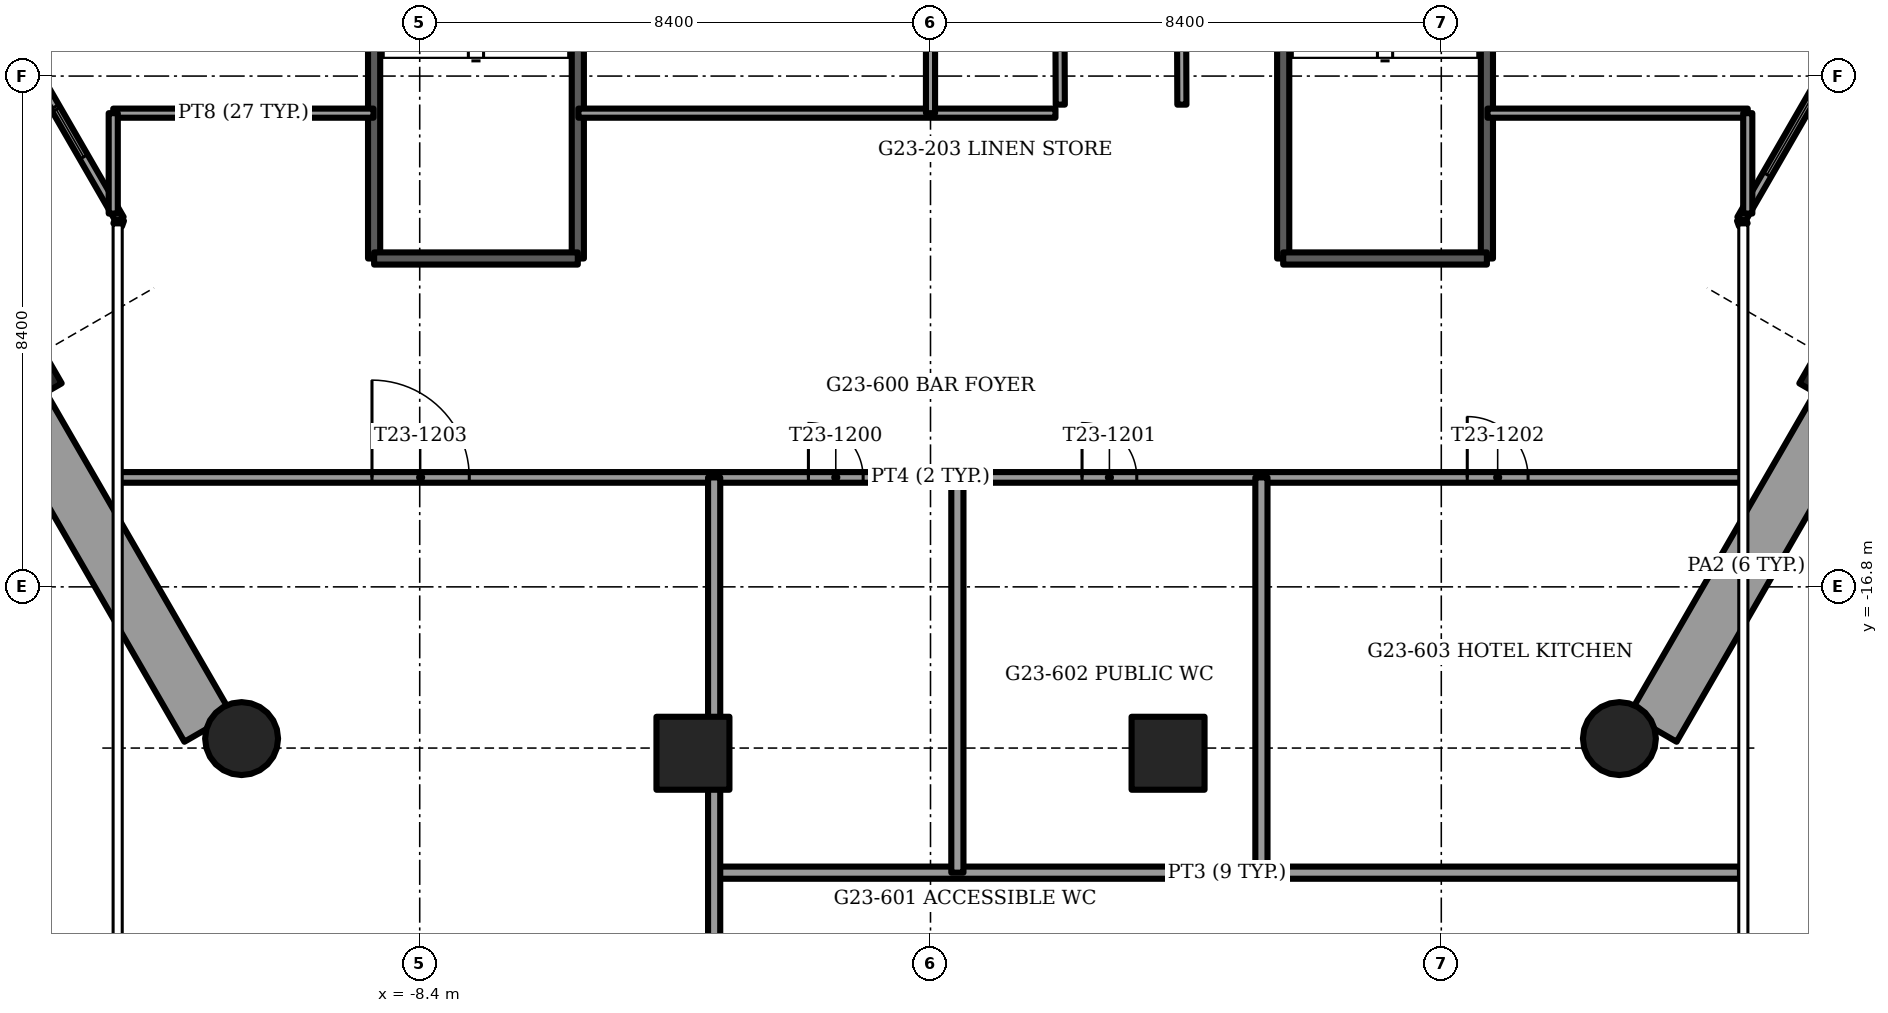
"""IFC4 building model, lengths in metres.
Left out: names, types, materials, properties, quantities, classifications, styles, units other than length and angle.
Written with IfcOpenShell. Run it as: python <this file> out.ifc"""

import sys

from ifc_helpers import new_model, si_unit, direction, frame, frame_2d, origin, origin_2d, place, context, subcontext, project, spatial, rectangle, circle, extrude, element, fill, save


model = new_model("IFC4")
c1 = context("Model", 3, precision=1e-05, world=origin(), true_north=direction((0.0, 1.0)))
c2 = subcontext(c1, "Body", "Model", "MODEL_VIEW")
j1 = project(units=[si_unit("LENGTHUNIT", "METRE"), si_unit("PLANEANGLEUNIT", "RADIAN")], contexts=[c1])
p1 = place(None, origin())
s1 = spatial("IfcSite", under=j1, at=p1, CompositionType="ELEMENT")
p2 = place(p1, origin())
s2 = spatial("IfcBuilding", under=s1, at=p2, CompositionType="ELEMENT")
p3 = place(p2, frame((0.0, 0.0, 93.0)))
s3 = spatial("IfcBuildingStorey", under=s2, at=p3, CompositionType="ELEMENT", Elevation=93.0)
for number, where, z_axis, x_axis in (
    (1, (-11.329, -19.295, -1.2), (0.0, 0.0, 1.0), (1.0, 0.0, 0.0)),
    (2, (11.329, -19.295, -1.2), (0.0, 0.0, 1.0), (1.0, 0.0, 0.0)),
):
    element("IfcColumn", number, at=place(p3, frame(where, z_axis=z_axis, x_axis=x_axis)), inside=s3, PredefinedType="COLUMN", context=c2, shape_type="SweptSolid", body=[
        extrude(circle(Radius=0.6, at=origin_2d()), origin(), (0.0, 0.0, 1.0), 3.75),
    ])
for number, where, z_axis, x_axis in (
    (3, (-15.107, -13.233, -1.2), (0.0, 0.0, 1.0), (-0.5, 0.866, 0.0)),
    (4, (-3.907, -19.536, -1.2), (0.0, 0.0, 1.0), (-1.0, 0.0, 0.0)),
    (5, (3.907, -19.536, -1.2), (0.0, 0.0, 1.0), (-1.0, 0.0, 0.0)),
    (6, (15.107, -13.233, -1.2), (0.0, 0.0, 1.0), (-0.5, -0.866, 0.0)),
):
    element("IfcColumn", number, at=place(p3, frame(where, z_axis=z_axis, x_axis=x_axis)), inside=s3, PredefinedType="COLUMN", context=c2, shape_type="SweptSolid", body=[
        extrude(rectangle(XDim=1.2, YDim=1.2, at=origin_2d()), origin(), (0.0, 0.0, 1.0), 3.75),
    ])
for number, where, z_axis, x_axis in (
    (7, (-14.952, -13.802, 0.0), (0.0, 0.0, 1.0), (0.5, -0.866, 0.0)),
    (8, (11.88, -19.123, 0.0), (0.0, 0.0, 1.0), (0.5, 0.866, 0.0)),
):
    element("IfcWall", number, at=place(p3, frame(where, z_axis=z_axis, x_axis=x_axis)), inside=s3, PredefinedType="PARAPET", context=c2, shape_type="SweptSolid", body=[
        extrude(rectangle(XDim=6.144, YDim=0.9, at=frame_2d((3.072, 0.0))), origin(), (0.0, 0.0, 1.0), 1.1),
    ])
p4 = place(p3, frame((-19.141, -0.696, 0.0), z_axis=(0.0, 0.0, 1.0), x_axis=(0.500002662854, -0.86602386638, 0.0)))
e9 = element("IfcWall", 9, at=p4, inside=s3, PredefinedType="SOLIDWALL", context=c2, shape_type="SweptSolid", body=[
    extrude(rectangle(XDim=11.615, YDim=0.15, at=frame_2d((5.807, 0.0))), origin(), (0.0, 0.0, 1.0), 3.45),
])
p5 = place(p4, frame((3.792, 0.0, 0.15)))
e10 = element("IfcOpeningElement", 10, at=p5, cuts=e9, PredefinedType="OPENING", context=c2, shape_type="SweptSolid", body=[
    extrude(rectangle(XDim=1.7, YDim=2.2, at=frame_2d((0.85, 1.1))), frame((0.0, 0.075, 0.0), z_axis=(0.0, -1.0, 0.0), x_axis=(1.0, 0.0, 0.0)), (0.0, 0.0, 1.0), 0.15),
])
p6 = place(p4, frame((9.531, 0.0, 0.15)))
e11 = element("IfcOpeningElement", 11, at=p6, cuts=e9, PredefinedType="OPENING", context=c2, shape_type="SweptSolid", body=[
    extrude(rectangle(XDim=0.9, YDim=2.2, at=frame_2d((0.45, 1.1))), frame((0.0, 0.075, 0.0), z_axis=(0.0, -1.0, 0.0), x_axis=(1.0, 0.0, 0.0)), (0.0, 0.0, 1.0), 0.15),
])
p7 = place(p4, frame((7.98, 0.0, 0.0)))
e12 = element("IfcOpeningElement", 12, at=p7, cuts=e9, PredefinedType="OPENING", context=c2, shape_type="SweptSolid", body=[
    extrude(rectangle(XDim=1.5, YDim=2.4, at=frame_2d((0.75, 1.2))), frame((0.0, 0.075, 0.0), z_axis=(0.0, -1.0, 0.0), x_axis=(1.0, 0.0, 0.0)), (0.0, 0.0, 1.0), 0.15),
])
p8 = place(p3, frame((13.334, -10.755, 0.0), z_axis=(0.0, 0.0, 1.0), x_axis=(0.500002662854, 0.86602386638, 0.0)))
e13 = element("IfcWall", 13, at=p8, inside=s3, PredefinedType="SOLIDWALL", context=c2, shape_type="SweptSolid", body=[
    extrude(rectangle(XDim=11.615, YDim=0.15, at=frame_2d((5.807, 0.0))), origin(), (0.0, 0.0, 1.0), 3.45),
])
p9 = place(p8, frame((0.847, 0.0, 0.15)))
e14 = element("IfcOpeningElement", 14, at=p9, cuts=e13, PredefinedType="OPENING", context=c2, shape_type="SweptSolid", body=[
    extrude(rectangle(XDim=1.7, YDim=2.2, at=frame_2d((0.85, 1.1))), frame((0.0, 0.075, 0.0), z_axis=(0.0, -1.0, 0.0), x_axis=(1.0, 0.0, 0.0)), (0.0, 0.0, 1.0), 0.15),
])
p10 = place(p8, frame((6.322, 0.0, 0.15)))
e15 = element("IfcOpeningElement", 15, at=p10, cuts=e13, PredefinedType="OPENING", context=c2, shape_type="SweptSolid", body=[
    extrude(rectangle(XDim=1.5, YDim=2.2, at=frame_2d((0.75, 1.1))), frame((0.0, 0.075, 0.0), z_axis=(0.0, -1.0, 0.0), x_axis=(1.0, 0.0, 0.0)), (0.0, 0.0, 1.0), 0.15),
])
for number, where, z_axis, x_axis in (
    (16, (-13.334, -10.755, 0.0), (0.0, 0.0, 1.0), (-0.338, -0.941, 0.0)),
    (17, (13.334, -10.755, 0.0), (0.0, 0.0, 1.0), (0.338, -0.941, 0.0)),
):
    element("IfcWall", number, at=place(p3, frame(where, z_axis=z_axis, x_axis=x_axis)), inside=s3, PredefinedType="SOLIDWALL", context=c2, shape_type="SweptSolid", body=[
        extrude(rectangle(XDim=0.098, YDim=0.15, at=frame_2d((0.049, 0.0))), origin(), (0.0, 0.0, 1.0), 3.45),
    ])
for number, where, z_axis, x_axis in (
    (18, (5.8, -3.7, -0.3), (0.0, 0.0, 1.0), (0.0, -1.0, 0.0)),
    (19, (9.15, -3.7, -0.3), (0.0, 0.0, 1.0), (0.0, -1.0, 0.0)),
):
    element("IfcWall", number, at=place(p3, frame(where, z_axis=z_axis, x_axis=x_axis)), inside=s3, PredefinedType="SOLIDWALL", context=c2, shape_type="SweptSolid", body=[
        extrude(rectangle(XDim=7.7, YDim=0.2, at=frame_2d((3.85, 0.0))), origin(), (0.0, 0.0, 1.0), 3.75),
    ])
p11 = place(p3, frame((5.8, -11.4, -0.3), z_axis=(0.0, 0.0, 1.0), x_axis=(1.0, 0.0, 0.0)))
e20 = element("IfcWall", 20, at=p11, inside=s3, PredefinedType="SOLIDWALL", context=c2, shape_type="SweptSolid", body=[
    extrude(rectangle(XDim=3.35, YDim=0.2, at=frame_2d((1.675, 0.0))), origin(), (0.0, 0.0, 1.0), 3.75),
])
for number, where, z_axis, x_axis in (
    (21, (-9.15, -3.7, -0.3), (0.0, 0.0, 1.0), (0.0, -1.0, 0.0)),
    (22, (-5.8, -3.7, -0.3), (0.0, 0.0, 1.0), (0.0, -1.0, 0.0)),
):
    element("IfcWall", number, at=place(p3, frame(where, z_axis=z_axis, x_axis=x_axis)), inside=s3, PredefinedType="SOLIDWALL", context=c2, shape_type="SweptSolid", body=[
        extrude(rectangle(XDim=7.7, YDim=0.2, at=frame_2d((3.85, 0.0))), origin(), (0.0, 0.0, 1.0), 3.75),
    ])
p12 = place(p3, frame((-9.15, -11.4, -0.3), z_axis=(0.0, 0.0, 1.0), x_axis=(1.0, 0.0, 0.0)))
e23 = element("IfcWall", 23, at=p12, inside=s3, PredefinedType="SOLIDWALL", context=c2, shape_type="SweptSolid", body=[
    extrude(rectangle(XDim=3.35, YDim=0.2, at=frame_2d((1.675, 0.0))), origin(), (0.0, 0.0, 1.0), 3.75),
])
p13 = place(p3, frame((-13.44, -9.01, 0.0), z_axis=(0.0, 0.0, 1.0), x_axis=(1.0, 0.0, 0.0)))
e24 = element("IfcWall", 24, at=p13, inside=s3, PredefinedType="PARTITIONING", context=c2, shape_type="SweptSolid", body=[
    extrude(rectangle(XDim=4.28, YDim=0.15, at=frame_2d((2.14, 0.0))), origin(), (0.0, 0.0, 1.0), 3.45),
])
p14 = place(p3, frame((-5.79, -9.01, 0.0), z_axis=(0.0, 0.0, 1.0), x_axis=(1.0, 0.0, 0.0)))
e25 = element("IfcWall", 25, at=p14, inside=s3, PredefinedType="PARTITIONING", context=c2, shape_type="SweptSolid", body=[
    extrude(rectangle(XDim=7.845, YDim=0.15, at=frame_2d((3.922, 0.0))), origin(), (0.0, 0.0, 1.0), 3.45),
])
p15 = place(p3, frame((9.16, -9.01, 0.0), z_axis=(0.0, 0.0, 1.0), x_axis=(1.0, 0.0, 0.0)))
e26 = element("IfcWall", 26, at=p15, inside=s3, PredefinedType="PARTITIONING", context=c2, shape_type="SweptSolid", body=[
    extrude(rectangle(XDim=4.28, YDim=0.15, at=frame_2d((2.14, 0.0))), origin(), (0.0, 0.0, 1.0), 3.45),
])
p16 = place(p3, frame((13.44, -10.661, 0.0), z_axis=(0.0, 0.0, 1.0), x_axis=(0.0, 1.0, 0.0)))
e27 = element("IfcWall", 27, at=p16, inside=s3, PredefinedType="PARTITIONING", context=c2, shape_type="SweptSolid", body=[
    extrude(rectangle(XDim=1.651, YDim=0.15, at=frame_2d((0.825, 0.0))), origin(), (0.0, 0.0, 1.0), 3.45),
])
p17 = place(p3, frame((0.0, -9.01, 0.0), z_axis=(0.0, 0.0, 1.0), x_axis=(0.0, 1.0, 0.0)))
e28 = element("IfcWall", 28, at=p17, inside=s3, PredefinedType="PARTITIONING", context=c2, shape_type="SweptSolid", body=[
    extrude(rectangle(XDim=5.31, YDim=0.15, at=frame_2d((2.655, 0.0))), origin(), (0.0, 0.0, 1.0), 3.45),
])
p18 = place(p3, frame((-13.44, -10.661, 0.0), z_axis=(0.0, 0.0, 1.0), x_axis=(0.0, 1.0, 0.0)))
e29 = element("IfcWall", 29, at=p18, inside=s3, PredefinedType="PARTITIONING", context=c2, shape_type="SweptSolid", body=[
    extrude(rectangle(XDim=1.651, YDim=0.15, at=frame_2d((0.825, 0.0))), origin(), (0.0, 0.0, 1.0), 3.45),
])
p19 = place(p3, frame((4.134, -8.87, 0.0), z_axis=(0.0, 0.0, 1.0), x_axis=(-0.003683216269, 0.999993216936, 0.0)))
e30 = element("IfcWall", 30, at=p19, inside=s3, PredefinedType="PARTITIONING", context=c2, shape_type="SweptSolid", body=[
    extrude(rectangle(XDim=5.17, YDim=0.15, at=frame_2d((2.585, 0.0))), origin(), (0.0, 0.0, 1.0), 3.45),
])
p20 = place(p3, frame((2.134, -8.87, 0.0), z_axis=(0.0, 0.0, 1.0), x_axis=(-0.003686872276, 0.999993203463, 0.0)))
e31 = element("IfcWall", 31, at=p20, inside=s3, PredefinedType="PARTITIONING", context=c2, shape_type="SweptSolid", body=[
    extrude(rectangle(XDim=5.165, YDim=0.15, at=frame_2d((2.583, 0.0))), origin(), (0.0, 0.0, 1.0), 3.45),
])
p21 = place(p3, frame((-13.348, -15.0, 0.0), z_axis=(0.0, 0.0, 1.0), x_axis=(1.0, 0.0, 0.0)))
e32 = element("IfcWall", 32, at=p21, inside=s3, PredefinedType="PARTITIONING", context=c2, shape_type="SweptSolid", body=[
    extrude(rectangle(XDim=26.696, YDim=0.175, at=frame_2d((13.348, 0.0))), origin(), (0.0, 0.0, 1.0), 3.45),
])
p22 = place(p21, frame((11.34, 0.0, 0.0)))
e33 = element("IfcOpeningElement", 33, at=p22, cuts=e32, PredefinedType="OPENING", context=c2, shape_type="SweptSolid", body=[
    extrude(rectangle(XDim=0.9, YDim=2.1, at=frame_2d((0.45, 1.05))), frame((0.0, 0.087, 0.0), z_axis=(0.0, -1.0, 0.0), x_axis=(1.0, 0.0, 0.0)), (0.0, 0.0, 1.0), 0.175),
])
p23 = place(p21, frame((15.84, 0.0, 0.0)))
e34 = element("IfcOpeningElement", 34, at=p23, cuts=e32, PredefinedType="OPENING", context=c2, shape_type="SweptSolid", body=[
    extrude(rectangle(XDim=0.9, YDim=2.1, at=frame_2d((0.45, 1.05))), frame((0.0, 0.087, 0.0), z_axis=(0.0, -1.0, 0.0), x_axis=(1.0, 0.0, 0.0)), (0.0, 0.0, 1.0), 0.175),
])
p24 = place(p21, frame((22.175, 0.0, 0.0)))
e35 = element("IfcOpeningElement", 35, at=p24, cuts=e32, PredefinedType="OPENING", context=c2, shape_type="SweptSolid", body=[
    extrude(rectangle(XDim=1.0, YDim=2.1, at=frame_2d((0.5, 1.05))), frame((0.0, 0.087, 0.0), z_axis=(0.0, -1.0, 0.0), x_axis=(1.0, 0.0, 0.0)), (0.0, 0.0, 1.0), 0.175),
])
p25 = place(p21, frame((4.163, 0.0, 0.0)))
e36 = element("IfcOpeningElement", 36, at=p25, cuts=e32, PredefinedType="OPENING", context=c2, shape_type="SweptSolid", body=[
    extrude(rectangle(XDim=1.6, YDim=2.1, at=frame_2d((0.8, 1.05))), frame((0.0, 0.087, 0.0), z_axis=(0.0, -1.0, 0.0), x_axis=(1.0, 0.0, 0.0)), (0.0, 0.0, 1.0), 0.175),
])
p26 = place(p3, frame((-3.558, -21.5, 0.0), z_axis=(0.0, 0.0, 1.0), x_axis=(1.0, 0.0, 0.0)))
e37 = element("IfcWall", 37, at=p26, inside=s3, PredefinedType="PARTITIONING", context=c2, shape_type="SweptSolid", body=[
    extrude(rectangle(XDim=16.87, YDim=0.2, at=frame_2d((8.435, 0.0))), origin(), (0.0, 0.0, 1.0), 3.45),
])
p27 = place(p3, frame((-3.558, -31.575, 0.0), z_axis=(0.0, 0.0, 1.0), x_axis=(0.0, 1.0, 0.0)))
e38 = element("IfcWall", 38, at=p27, inside=s3, PredefinedType="PARTITIONING", context=c2, shape_type="SweptSolid", body=[
    extrude(rectangle(XDim=16.575, YDim=0.2, at=frame_2d((8.288, 0.0))), origin(), (0.0, 0.0, 1.0), 2.828),
])
p28 = place(p27, frame((4.293, 0.0, 0.0)))
e39 = element("IfcOpeningElement", 39, at=p28, cuts=e38, PredefinedType="OPENING", context=c2, shape_type="SweptSolid", body=[
    extrude(rectangle(XDim=1.6, YDim=2.1, at=frame_2d((0.8, 1.05))), frame((0.0, 0.1, 0.0), z_axis=(0.0, -1.0, 0.0), x_axis=(1.0, 0.0, 0.0)), (0.0, 0.0, 1.0), 0.2),
])
for number, where, z_axis, x_axis in (
    (40, (0.442, -21.5, 0.0), (0.0, 0.0, 1.0), (0.0, 1.0, 0.0)),
    (41, (5.442, -21.5, 0.0), (0.0, 0.0, 1.0), (0.0, 1.0, 0.0)),
):
    element("IfcWall", number, at=place(p3, frame(where, z_axis=z_axis, x_axis=x_axis)), inside=s3, PredefinedType="PARTITIONING", context=c2, shape_type="SweptSolid", body=[
        extrude(rectangle(XDim=6.5, YDim=0.2, at=frame_2d((3.25, 0.0))), origin(), (0.0, 0.0, 1.0), 2.828),
    ])
p29 = place(p6, origin())
e42 = element("IfcWindow", 42, at=p29, inside=s3, PartitioningType="SINGLE_PANEL", PredefinedType="WINDOW", context=c2, shape_type="SweptSolid", body=[
    extrude(rectangle(XDim=0.9, YDim=2.2, at=frame_2d((0.45, 1.1))), frame((0.0, 0.03, 0.0), z_axis=(0.0, -1.0, 0.0), x_axis=(1.0, 0.0, 0.0)), (0.0, 0.0, 1.0), 0.06),
])
fill(e11, e42)
p30 = place(p7, origin())
e43 = element("IfcDoor", 43, at=p30, inside=s3, OperationType="SLIDING_TO_RIGHT", PredefinedType="DOOR", context=c2, shape_type="SweptSolid", body=[
    extrude(rectangle(XDim=1.5, YDim=2.4, at=frame_2d((0.75, 1.2))), frame((0.0, 0.025, 0.0), z_axis=(0.0, -1.0, 0.0), x_axis=(1.0, 0.0, 0.0)), (0.0, 0.0, 1.0), 0.05),
])
fill(e12, e43)
p31 = place(p9, origin())
e44 = element("IfcWindow", 44, at=p31, inside=s3, PartitioningType="SINGLE_PANEL", PredefinedType="WINDOW", context=c2, shape_type="SweptSolid", body=[
    extrude(rectangle(XDim=1.7, YDim=2.2, at=frame_2d((0.85, 1.1))), frame((0.0, 0.03, 0.0), z_axis=(0.0, -1.0, 0.0), x_axis=(1.0, 0.0, 0.0)), (0.0, 0.0, 1.0), 0.06),
])
fill(e14, e44)
p32 = place(p22, origin())
e45 = element("IfcDoor", 45, at=p32, inside=s3, OperationType="SINGLE_SWING_RIGHT", PredefinedType="DOOR", context=c2, shape_type="SweptSolid", body=[
    extrude(rectangle(XDim=0.9, YDim=2.1, at=frame_2d((0.45, 1.05))), frame((0.0, 0.025, 0.0), z_axis=(0.0, -1.0, 0.0), x_axis=(1.0, 0.0, 0.0)), (0.0, 0.0, 1.0), 0.05),
])
fill(e33, e45)
p33 = place(p23, origin())
e46 = element("IfcDoor", 46, at=p33, inside=s3, OperationType="SINGLE_SWING_LEFT", PredefinedType="DOOR", context=c2, shape_type="SweptSolid", body=[
    extrude(rectangle(XDim=0.9, YDim=2.1, at=frame_2d((0.45, 1.05))), frame((0.0, 0.025, 0.0), z_axis=(0.0, -1.0, 0.0), x_axis=(1.0, 0.0, 0.0)), (0.0, 0.0, 1.0), 0.05),
])
fill(e34, e46)
p34 = place(p24, origin())
e47 = element("IfcDoor", 47, at=p34, inside=s3, OperationType="SINGLE_SWING_RIGHT", PredefinedType="DOOR", context=c2, shape_type="SweptSolid", body=[
    extrude(rectangle(XDim=1.0, YDim=2.1, at=frame_2d((0.5, 1.05))), frame((0.0, 0.025, 0.0), z_axis=(0.0, -1.0, 0.0), x_axis=(1.0, 0.0, 0.0)), (0.0, 0.0, 1.0), 0.05),
])
fill(e35, e47)
p35 = place(p25, origin())
e48 = element("IfcDoor", 48, at=p35, inside=s3, OperationType="DOUBLE_DOOR_SINGLE_SWING", PredefinedType="DOOR", context=c2, shape_type="SweptSolid", body=[
    extrude(rectangle(XDim=1.6, YDim=2.1, at=frame_2d((0.8, 1.05))), frame((0.0, 0.025, 0.0), z_axis=(0.0, -1.0, 0.0), x_axis=(1.0, 0.0, 0.0)), (0.0, 0.0, 1.0), 0.05),
])
fill(e36, e48)
save(model, sys.argv[1])
